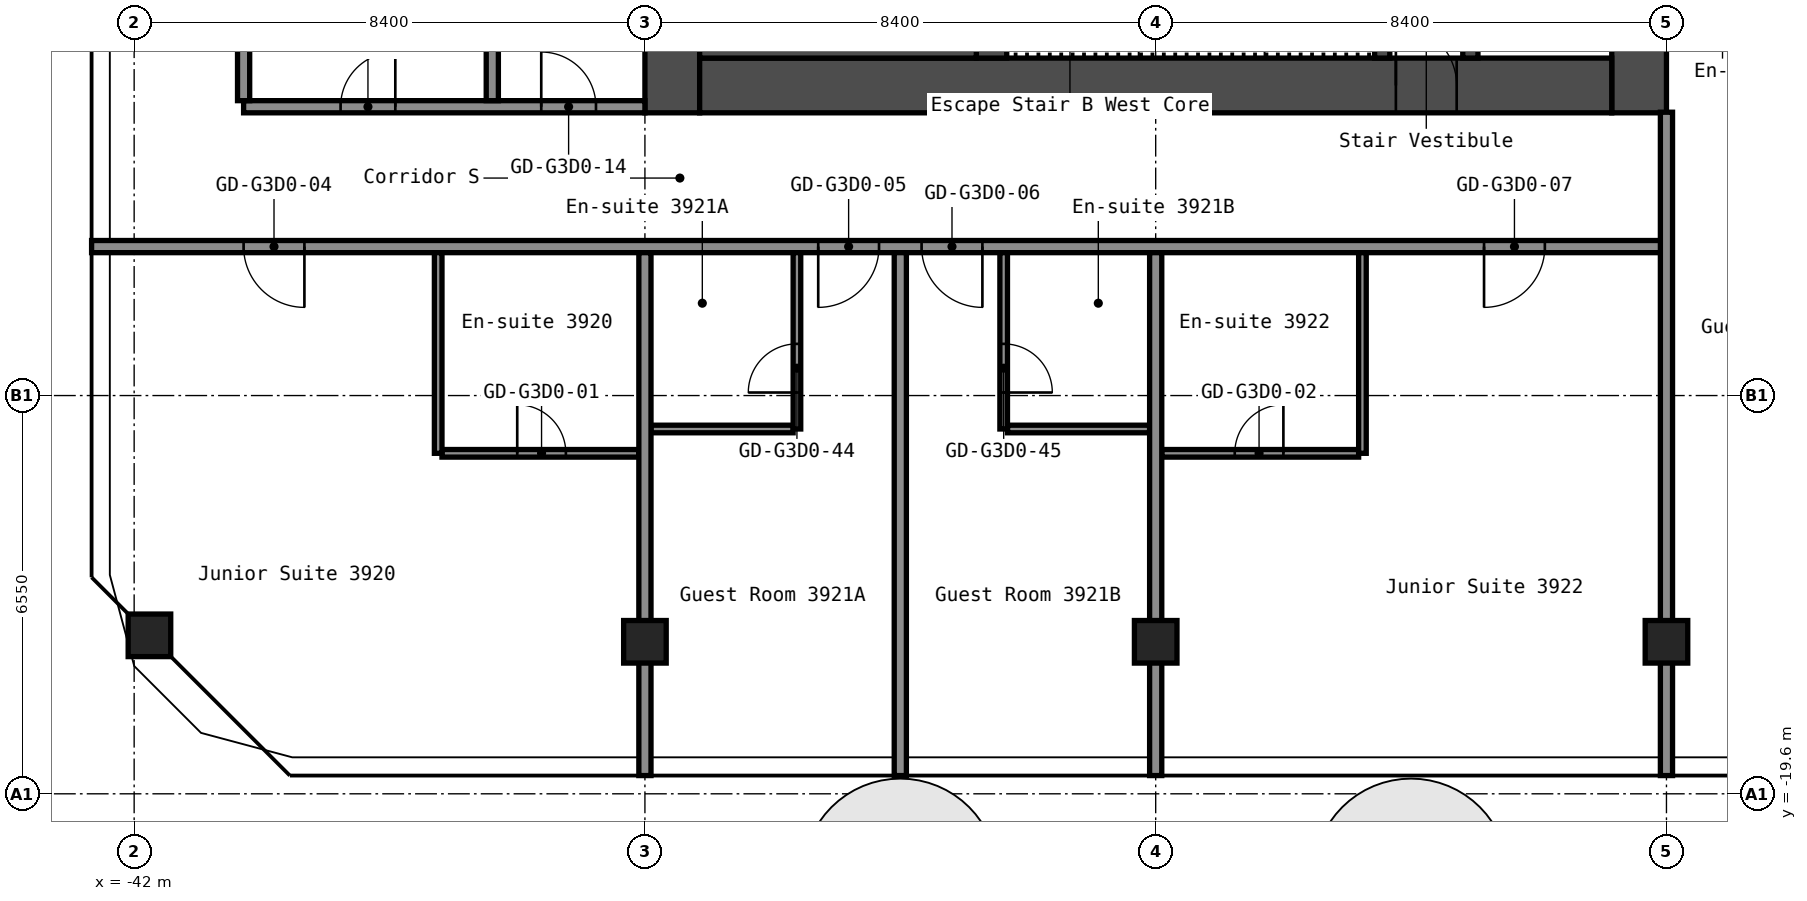
"""IFC4 building model, lengths in metres.
Left out: names, types, materials, properties, quantities, classifications, styles, units other than length and angle.
Written with IfcOpenShell. Run it as: python <this file> out.ifc"""

import sys

from ifc_helpers import new_model, si_unit, direction, frame, frame_2d, origin, origin_2d, place, context, subcontext, project, spatial, rectangle, hollow_rectangle, extrude, element, fill, save


model = new_model("IFC4")
c1 = context("Model", 3, precision=1e-05, world=origin(), true_north=direction((0.0, 1.0)))
c2 = subcontext(c1, "Body", "Model", "MODEL_VIEW")
j1 = project(units=[si_unit("LENGTHUNIT", "METRE"), si_unit("PLANEANGLEUNIT", "RADIAN")], contexts=[c1])
p1 = place(None, origin())
s1 = spatial("IfcSite", under=j1, at=p1, CompositionType="ELEMENT")
p2 = place(p1, origin())
s2 = spatial("IfcBuilding", under=s1, at=p2, CompositionType="ELEMENT")
p3 = place(p2, frame((0.0, 0.0, 140.6)))
s3 = spatial("IfcBuildingStorey", under=s2, at=p3, CompositionType="ELEMENT", Elevation=140.6)
for number, where, z_axis, x_axis in (
    (1, (-41.749, -16.994, 0.0), (0.0, 0.0, 1.0), (1.0, 0.0, 0.0)),
    (2, (-33.6, -17.1, 0.0), (0.0, 0.0, 1.0), (1.0, 0.0, 0.0)),
    (3, (-25.2, -17.1, 0.0), (0.0, 0.0, 1.0), (1.0, 0.0, 0.0)),
    (4, (-16.8, -17.1, 0.0), (0.0, 0.0, 1.0), (1.0, 0.0, 0.0)),
):
    element("IfcColumn", number, at=place(p3, frame(where, z_axis=z_axis, x_axis=x_axis)), inside=s3, PredefinedType="COLUMN", context=c2, shape_type="SweptSolid", body=[
        extrude(hollow_rectangle(XDim=0.7, YDim=0.7, WallThickness=0.028, at=origin_2d()), origin(), (0.0, 0.0, 1.0), 2.75),
    ])
p4 = place(p3, frame((-17.25, -8.4, 0.0), z_axis=(0.0, 0.0, 1.0), x_axis=(0.0, 1.0, 0.0)))
e5 = element("IfcWall", 5, at=p4, inside=s3, PredefinedType="SHEAR", context=c2, shape_type="SweptSolid", body=[
    extrude(rectangle(XDim=16.8, YDim=0.9, at=frame_2d((8.4, 0.0))), origin(), (0.0, 0.0, 1.0), 2.75),
])
p5 = place(p4, frame((7.1, 0.0, 0.0)))
e6 = element("IfcOpeningElement", 6, at=p5, cuts=e5, PredefinedType="OPENING", context=c2, shape_type="SweptSolid", body=[
    extrude(rectangle(XDim=1.6, YDim=2.1, at=frame_2d((0.8, 1.05))), frame((0.0, 0.46, 0.0), z_axis=(0.0, -1.0, 0.0), x_axis=(1.0, 0.0, 0.0)), (0.0, 0.0, 1.0), 0.92),
])
p6 = place(p3, frame((-33.15, -8.4, 0.0), z_axis=(0.0, 0.0, 1.0), x_axis=(0.0, 1.0, 0.0)))
e7 = element("IfcWall", 7, at=p6, inside=s3, PredefinedType="SHEAR", context=c2, shape_type="SweptSolid", body=[
    extrude(rectangle(XDim=16.8, YDim=0.9, at=frame_2d((8.4, 0.0))), origin(), (0.0, 0.0, 1.0), 2.75),
])
p7 = place(p3, frame((-32.7, -7.95, 0.0), z_axis=(0.0, 0.0, 1.0), x_axis=(1.0, 0.0, 0.0)))
e8 = element("IfcWall", 8, at=p7, inside=s3, PredefinedType="SHEAR", context=c2, shape_type="SweptSolid", body=[
    extrude(rectangle(XDim=15.0, YDim=0.9, at=frame_2d((7.5, 0.0))), origin(), (0.0, 0.0, 1.0), 2.75),
])
p8 = place(p7, frame((11.45, 0.0, 0.0)))
e9 = element("IfcOpeningElement", 9, at=p8, cuts=e8, PredefinedType="OPENING", context=c2, shape_type="SweptSolid", body=[
    extrude(rectangle(XDim=1.0, YDim=2.1, at=frame_2d((0.5, 1.05))), frame((0.0, 0.46, 0.0), z_axis=(0.0, -1.0, 0.0), x_axis=(1.0, 0.0, 0.0)), (0.0, 0.0, 1.0), 0.92),
])
p9 = place(p3, frame((-20.025, -7.5, 0.0), z_axis=(0.0, 0.0, 1.0), x_axis=(0.0, 1.0, 0.0)))
e10 = element("IfcWall", 10, at=p9, inside=s3, PredefinedType="SHEAR", context=c2, shape_type="SweptSolid", body=[
    extrude(rectangle(XDim=6.3, YDim=0.25, at=frame_2d((3.15, 0.0))), origin(), (0.0, 0.0, 1.0), 2.75),
])
p10 = place(p9, frame((2.4, 0.0, 0.0)))
e11 = element("IfcOpeningElement", 11, at=p10, cuts=e10, PredefinedType="OPENING", context=c2, shape_type="SweptSolid", body=[
    extrude(rectangle(XDim=1.0, YDim=2.1, at=frame_2d((0.5, 1.05))), frame((0.0, 0.135, 0.0), z_axis=(0.0, -1.0, 0.0), x_axis=(1.0, 0.0, 0.0)), (0.0, 0.0, 1.0), 0.27),
])
p11 = place(p3, frame((-21.475, -7.5, 0.0), z_axis=(0.0, 0.0, 1.0), x_axis=(0.0, 1.0, 0.0)))
e12 = element("IfcWall", 12, at=p11, inside=s3, PredefinedType="SHEAR", context=c2, shape_type="SweptSolid", body=[
    extrude(rectangle(XDim=3.75, YDim=0.25, at=frame_2d((1.875, 0.0))), origin(), (0.0, 0.0, 1.0), 2.75),
])
p12 = place(p11, frame((1.3, 0.0, 0.0)))
e13 = element("IfcOpeningElement", 13, at=p12, cuts=e12, PredefinedType="OPENING", context=c2, shape_type="SweptSolid", body=[
    extrude(rectangle(XDim=1.2, YDim=2.1, at=frame_2d((0.6, 1.05))), frame((0.0, 0.135, 0.0), z_axis=(0.0, -1.0, 0.0), x_axis=(1.0, 0.0, 0.0)), (0.0, 0.0, 1.0), 0.27),
])
p13 = place(p3, frame((-27.9, -7.5, 0.0), z_axis=(0.0, 0.0, 1.0), x_axis=(0.0, 1.0, 0.0)))
e14 = element("IfcWall", 14, at=p13, inside=s3, PredefinedType="SHEAR", context=c2, shape_type="SweptSolid", body=[
    extrude(rectangle(XDim=3.75, YDim=0.5, at=frame_2d((1.875, 0.0))), origin(), (0.0, 0.0, 1.0), 2.75),
])
p14 = place(p3, frame((-32.7, -6.75, 0.0), z_axis=(0.0, 0.0, 1.0), x_axis=(1.0, 0.0, 0.0)))
e15 = element("IfcWall", 15, at=p14, inside=s3, PredefinedType="SHEAR", context=c2, shape_type="SweptSolid", body=[
    extrude(rectangle(XDim=4.55, YDim=1.5, at=frame_2d((2.275, 0.0))), origin(), (0.0, 0.0, 1.0), 2.75),
])
p15 = place(p3, frame((-36.938, -14.0, 0.0), z_axis=(0.0, 0.0, 1.0), x_axis=(1.0, 0.0, 0.0)))
e16 = element("IfcWall", 16, at=p15, inside=s3, PredefinedType="PARTITIONING", context=c2, shape_type="SweptSolid", body=[
    extrude(rectangle(XDim=3.238, YDim=0.125, at=frame_2d((1.619, 0.0))), origin(), (0.0, 0.0, 1.0), 2.75),
])
p16 = place(p15, frame((1.238, 0.0, 0.0)))
e17 = element("IfcOpeningElement", 17, at=p16, cuts=e16, PredefinedType="OPENING", context=c2, shape_type="SweptSolid", body=[
    extrude(rectangle(XDim=0.8, YDim=2.1, at=frame_2d((0.4, 1.05))), frame((0.0, 0.073, 0.0), z_axis=(0.0, -1.0, 0.0), x_axis=(1.0, 0.0, 0.0)), (0.0, 0.0, 1.0), 0.145),
])
p17 = place(p3, frame((-25.1, -14.0, 0.0), z_axis=(0.0, 0.0, 1.0), x_axis=(1.0, 0.0, 0.0)))
e18 = element("IfcWall", 18, at=p17, inside=s3, PredefinedType="PARTITIONING", context=c2, shape_type="SweptSolid", body=[
    extrude(rectangle(XDim=3.238, YDim=0.125, at=frame_2d((1.619, 0.0))), origin(), (0.0, 0.0, 1.0), 2.75),
])
p18 = place(p17, frame((1.2, 0.0, 0.0)))
e19 = element("IfcOpeningElement", 19, at=p18, cuts=e18, PredefinedType="OPENING", context=c2, shape_type="SweptSolid", body=[
    extrude(rectangle(XDim=0.8, YDim=2.1, at=frame_2d((0.4, 1.05))), frame((0.0, 0.073, 0.0), z_axis=(0.0, -1.0, 0.0), x_axis=(1.0, 0.0, 0.0)), (0.0, 0.0, 1.0), 0.145),
])
for number, where, z_axis, x_axis in (
    (20, (-33.5, -13.6, 0.0), (0.0, 0.0, 1.0), (1.0, 0.0, 0.0)),
    (21, (-27.637, -13.6, 0.0), (0.0, 0.0, 1.0), (1.0, 0.0, 0.0)),
):
    element("IfcWall", number, at=place(p3, frame(where, z_axis=z_axis, x_axis=x_axis)), inside=s3, PredefinedType="PARTITIONING", context=c2, shape_type="SweptSolid", body=[
        extrude(rectangle(XDim=2.337, YDim=0.125, at=frame_2d((1.169, 0.0))), origin(), (0.0, 0.0, 1.0), 2.75),
    ])
p19 = place(p3, frame((-42.7, -10.6, 0.0), z_axis=(0.0, 0.0, 1.0), x_axis=(1.0, 0.0, 0.0)))
e22 = element("IfcWall", 22, at=p19, inside=s3, PredefinedType="PARTITIONING", context=c2, shape_type="SweptSolid", body=[
    extrude(rectangle(XDim=25.9, YDim=0.2, at=frame_2d((12.95, 0.0))), origin(), (0.0, 0.0, 1.0), 2.75),
])
p20 = place(p19, frame((2.5, 0.0, 0.0)))
e23 = element("IfcOpeningElement", 23, at=p20, cuts=e22, PredefinedType="OPENING", context=c2, shape_type="SweptSolid", body=[
    extrude(rectangle(XDim=1.0, YDim=2.1, at=frame_2d((0.5, 1.05))), frame((0.0, 0.11, 0.0), z_axis=(0.0, -1.0, 0.0), x_axis=(1.0, 0.0, 0.0)), (0.0, 0.0, 1.0), 0.22),
])
p21 = place(p19, frame((11.95, 0.0, 0.0)))
e24 = element("IfcOpeningElement", 24, at=p21, cuts=e22, PredefinedType="OPENING", context=c2, shape_type="SweptSolid", body=[
    extrude(rectangle(XDim=1.0, YDim=2.1, at=frame_2d((0.5, 1.05))), frame((0.0, 0.11, 0.0), z_axis=(0.0, -1.0, 0.0), x_axis=(1.0, 0.0, 0.0)), (0.0, 0.0, 1.0), 0.22),
])
p22 = place(p19, frame((13.65, 0.0, 0.0)))
e25 = element("IfcOpeningElement", 25, at=p22, cuts=e22, PredefinedType="OPENING", context=c2, shape_type="SweptSolid", body=[
    extrude(rectangle(XDim=1.0, YDim=2.1, at=frame_2d((0.5, 1.05))), frame((0.0, 0.11, 0.0), z_axis=(0.0, -1.0, 0.0), x_axis=(1.0, 0.0, 0.0)), (0.0, 0.0, 1.0), 0.22),
])
p23 = place(p19, frame((22.9, 0.0, 0.0)))
e26 = element("IfcOpeningElement", 26, at=p23, cuts=e22, PredefinedType="OPENING", context=c2, shape_type="SweptSolid", body=[
    extrude(rectangle(XDim=1.0, YDim=2.1, at=frame_2d((0.5, 1.05))), frame((0.0, 0.11, 0.0), z_axis=(0.0, -1.0, 0.0), x_axis=(1.0, 0.0, 0.0)), (0.0, 0.0, 1.0), 0.22),
])
p24 = place(p3, frame((-40.2, -8.3, 0.0), z_axis=(0.0, 0.0, 1.0), x_axis=(1.0, 0.0, 0.0)))
e27 = element("IfcWall", 27, at=p24, inside=s3, PredefinedType="PARTITIONING", context=c2, shape_type="SweptSolid", body=[
    extrude(rectangle(XDim=6.6, YDim=0.2, at=frame_2d((3.3, 0.0))), origin(), (0.0, 0.0, 1.0), 2.75),
])
p25 = place(p24, frame((1.595, 0.0, 0.0)))
e28 = element("IfcOpeningElement", 28, at=p25, cuts=e27, PredefinedType="OPENING", context=c2, shape_type="SweptSolid", body=[
    extrude(rectangle(XDim=0.9, YDim=2.1, at=frame_2d((0.45, 1.05))), frame((0.0, 0.11, 0.0), z_axis=(0.0, -1.0, 0.0), x_axis=(1.0, 0.0, 0.0)), (0.0, 0.0, 1.0), 0.22),
])
p26 = place(p24, frame((4.895, 0.0, 0.0)))
e29 = element("IfcOpeningElement", 29, at=p26, cuts=e27, PredefinedType="OPENING", context=c2, shape_type="SweptSolid", body=[
    extrude(rectangle(XDim=0.9, YDim=2.1, at=frame_2d((0.45, 1.05))), frame((0.0, 0.11, 0.0), z_axis=(0.0, -1.0, 0.0), x_axis=(1.0, 0.0, 0.0)), (0.0, 0.0, 1.0), 0.22),
])
p27 = place(p3, frame((-40.2, -8.2, 0.0), z_axis=(0.0, 0.0, 1.0), x_axis=(0.0, 1.0, 0.0)))
e30 = element("IfcWall", 30, at=p27, inside=s3, PredefinedType="PARTITIONING", context=c2, shape_type="SweptSolid", body=[
    extrude(rectangle(XDim=16.4, YDim=0.2, at=frame_2d((8.2, 0.0))), origin(), (0.0, 0.0, 1.0), 2.75),
])
p28 = place(p3, frame((-37.0, -14.0, 0.0), z_axis=(0.0, 0.0, 1.0), x_axis=(0.0, 1.0, 0.0)))
e31 = element("IfcWall", 31, at=p28, inside=s3, PredefinedType="PARTITIONING", context=c2, shape_type="SweptSolid", body=[
    extrude(rectangle(XDim=3.3, YDim=0.125, at=frame_2d((1.65, 0.0))), origin(), (0.0, 0.0, 1.0), 2.75),
])
p29 = place(p3, frame((-36.11, -8.2, 0.0), z_axis=(0.0, 0.0, 1.0), x_axis=(0.0, 1.0, 0.0)))
e32 = element("IfcWall", 32, at=p29, inside=s3, PredefinedType="PARTITIONING", context=c2, shape_type="SweptSolid", body=[
    extrude(rectangle(XDim=8.2, YDim=0.2, at=frame_2d((4.1, 0.0))), origin(), (0.0, 0.0, 1.0), 2.75),
])
p30 = place(p3, frame((-33.6, -19.3, 0.0), z_axis=(0.0, 0.0, 1.0), x_axis=(0.0, 1.0, 0.0)))
e33 = element("IfcWall", 33, at=p30, inside=s3, PredefinedType="PARTITIONING", context=c2, shape_type="SweptSolid", body=[
    extrude(rectangle(XDim=8.6, YDim=0.2, at=frame_2d((4.3, 0.0))), origin(), (0.0, 0.0, 1.0), 2.75),
])
p31 = place(p3, frame((-31.1, -13.6, 0.0), z_axis=(0.0, 0.0, 1.0), x_axis=(0.0, 1.0, 0.0)))
e34 = element("IfcWall", 34, at=p31, inside=s3, PredefinedType="PARTITIONING", context=c2, shape_type="SweptSolid", body=[
    extrude(rectangle(XDim=2.9, YDim=0.125, at=frame_2d((1.45, 0.0))), origin(), (0.0, 0.0, 1.0), 2.75),
])
p32 = place(p31, frame((0.6, 0.0, 0.0)))
e35 = element("IfcOpeningElement", 35, at=p32, cuts=e34, PredefinedType="OPENING", context=c2, shape_type="SweptSolid", body=[
    extrude(rectangle(XDim=0.8, YDim=2.1, at=frame_2d((0.4, 1.05))), frame((0.0, 0.073, 0.0), z_axis=(0.0, -1.0, 0.0), x_axis=(1.0, 0.0, 0.0)), (0.0, 0.0, 1.0), 0.145),
])
p33 = place(p3, frame((-29.4, -19.3, 0.0), z_axis=(0.0, 0.0, 1.0), x_axis=(0.0, 1.0, 0.0)))
e36 = element("IfcWall", 36, at=p33, inside=s3, PredefinedType="PARTITIONING", context=c2, shape_type="SweptSolid", body=[
    extrude(rectangle(XDim=8.6, YDim=0.2, at=frame_2d((4.3, 0.0))), origin(), (0.0, 0.0, 1.0), 2.75),
])
p34 = place(p3, frame((-27.7, -13.6, 0.0), z_axis=(0.0, 0.0, 1.0), x_axis=(0.0, 1.0, 0.0)))
e37 = element("IfcWall", 37, at=p34, inside=s3, PredefinedType="PARTITIONING", context=c2, shape_type="SweptSolid", body=[
    extrude(rectangle(XDim=2.9, YDim=0.125, at=frame_2d((1.45, 0.0))), origin(), (0.0, 0.0, 1.0), 2.75),
])
p35 = place(p34, frame((0.6, 0.0, 0.0)))
e38 = element("IfcOpeningElement", 38, at=p35, cuts=e37, PredefinedType="OPENING", context=c2, shape_type="SweptSolid", body=[
    extrude(rectangle(XDim=0.8, YDim=2.1, at=frame_2d((0.4, 1.05))), frame((0.0, 0.073, 0.0), z_axis=(0.0, -1.0, 0.0), x_axis=(1.0, 0.0, 0.0)), (0.0, 0.0, 1.0), 0.145),
])
p36 = place(p3, frame((-25.2, -19.3, 0.0), z_axis=(0.0, 0.0, 1.0), x_axis=(0.0, 1.0, 0.0)))
e39 = element("IfcWall", 39, at=p36, inside=s3, PredefinedType="PARTITIONING", context=c2, shape_type="SweptSolid", body=[
    extrude(rectangle(XDim=8.6, YDim=0.2, at=frame_2d((4.3, 0.0))), origin(), (0.0, 0.0, 1.0), 2.75),
])
p37 = place(p3, frame((-21.8, -14.0, 0.0), z_axis=(0.0, 0.0, 1.0), x_axis=(0.0, 1.0, 0.0)))
e40 = element("IfcWall", 40, at=p37, inside=s3, PredefinedType="PARTITIONING", context=c2, shape_type="SweptSolid", body=[
    extrude(rectangle(XDim=3.3, YDim=0.125, at=frame_2d((1.65, 0.0))), origin(), (0.0, 0.0, 1.0), 2.75),
])
p38 = place(p3, frame((-16.8, -19.3, 0.0), z_axis=(0.0, 0.0, 1.0), x_axis=(0.0, 1.0, 0.0)))
e41 = element("IfcWall", 41, at=p38, inside=s3, PredefinedType="PARTITIONING", context=c2, shape_type="SweptSolid", body=[
    extrude(rectangle(XDim=10.91, YDim=0.2, at=frame_2d((5.455, 0.0))), origin(), (0.0, 0.0, 1.0), 2.75),
])
p39 = place(p8, origin())
e42 = element("IfcDoor", 42, at=p39, inside=s3, OperationType="SINGLE_SWING_RIGHT", PredefinedType="DOOR", context=c2, shape_type="SweptSolid", body=[
    extrude(rectangle(XDim=1.0, YDim=2.1, at=frame_2d((0.5, 1.05))), frame((0.0, 0.025, 0.0), z_axis=(0.0, -1.0, 0.0), x_axis=(1.0, 0.0, 0.0)), (0.0, 0.0, 1.0), 0.05),
])
fill(e9, e42)
p40 = place(p16, origin())
e43 = element("IfcDoor", 43, at=p40, inside=s3, OperationType="SINGLE_SWING_RIGHT", PredefinedType="DOOR", context=c2, shape_type="SweptSolid", body=[
    extrude(rectangle(XDim=0.8, YDim=2.1, at=frame_2d((0.4, 1.05))), frame((0.0, 0.025, 0.0), z_axis=(0.0, -1.0, 0.0), x_axis=(1.0, 0.0, 0.0)), (0.0, 0.0, 1.0), 0.05),
])
fill(e17, e43)
p41 = place(p18, origin())
e44 = element("IfcDoor", 44, at=p41, inside=s3, OperationType="SINGLE_SWING_LEFT", PredefinedType="DOOR", context=c2, shape_type="SweptSolid", body=[
    extrude(rectangle(XDim=0.8, YDim=2.1, at=frame_2d((0.4, 1.05))), frame((0.0, 0.025, 0.0), z_axis=(0.0, -1.0, 0.0), x_axis=(1.0, 0.0, 0.0)), (0.0, 0.0, 1.0), 0.05),
])
fill(e19, e44)
p42 = place(p20, origin())
e45 = element("IfcDoor", 45, at=p42, inside=s3, OperationType="SINGLE_SWING_RIGHT", PredefinedType="DOOR", context=c2, shape_type="SweptSolid", body=[
    extrude(rectangle(XDim=1.0, YDim=2.1, at=frame_2d((0.5, 1.05))), frame((0.0, 0.025, 0.0), z_axis=(0.0, -1.0, 0.0), x_axis=(1.0, 0.0, 0.0)), (0.0, 0.0, 1.0), 0.05),
])
fill(e23, e45)
p43 = place(p21, origin())
e46 = element("IfcDoor", 46, at=p43, inside=s3, OperationType="SINGLE_SWING_LEFT", PredefinedType="DOOR", context=c2, shape_type="SweptSolid", body=[
    extrude(rectangle(XDim=1.0, YDim=2.1, at=frame_2d((0.5, 1.05))), frame((0.0, 0.025, 0.0), z_axis=(0.0, -1.0, 0.0), x_axis=(1.0, 0.0, 0.0)), (0.0, 0.0, 1.0), 0.05),
])
fill(e24, e46)
p44 = place(p22, origin())
e47 = element("IfcDoor", 47, at=p44, inside=s3, OperationType="SINGLE_SWING_RIGHT", PredefinedType="DOOR", context=c2, shape_type="SweptSolid", body=[
    extrude(rectangle(XDim=1.0, YDim=2.1, at=frame_2d((0.5, 1.05))), frame((0.0, 0.025, 0.0), z_axis=(0.0, -1.0, 0.0), x_axis=(1.0, 0.0, 0.0)), (0.0, 0.0, 1.0), 0.05),
])
fill(e25, e47)
p45 = place(p23, origin())
e48 = element("IfcDoor", 48, at=p45, inside=s3, OperationType="SINGLE_SWING_LEFT", PredefinedType="DOOR", context=c2, shape_type="SweptSolid", body=[
    extrude(rectangle(XDim=1.0, YDim=2.1, at=frame_2d((0.5, 1.05))), frame((0.0, 0.025, 0.0), z_axis=(0.0, -1.0, 0.0), x_axis=(1.0, 0.0, 0.0)), (0.0, 0.0, 1.0), 0.05),
])
fill(e26, e48)
p46 = place(p25, origin())
e49 = element("IfcDoor", 49, at=p46, inside=s3, OperationType="SINGLE_SWING_LEFT", PredefinedType="DOOR", context=c2, shape_type="SweptSolid", body=[
    extrude(rectangle(XDim=0.9, YDim=2.1, at=frame_2d((0.45, 1.05))), frame((0.0, 0.025, 0.0), z_axis=(0.0, -1.0, 0.0), x_axis=(1.0, 0.0, 0.0)), (0.0, 0.0, 1.0), 0.05),
])
fill(e28, e49)
p47 = place(p26, origin())
e50 = element("IfcDoor", 50, at=p47, inside=s3, OperationType="SINGLE_SWING_RIGHT", PredefinedType="DOOR", context=c2, shape_type="SweptSolid", body=[
    extrude(rectangle(XDim=0.9, YDim=2.1, at=frame_2d((0.45, 1.05))), frame((0.0, 0.025, 0.0), z_axis=(0.0, -1.0, 0.0), x_axis=(1.0, 0.0, 0.0)), (0.0, 0.0, 1.0), 0.05),
])
fill(e29, e50)
p48 = place(p32, origin())
e51 = element("IfcDoor", 51, at=p48, inside=s3, OperationType="SINGLE_SWING_RIGHT", PredefinedType="DOOR", context=c2, shape_type="SweptSolid", body=[
    extrude(rectangle(XDim=0.8, YDim=2.1, at=frame_2d((0.4, 1.05))), frame((0.0, 0.025, 0.0), z_axis=(0.0, -1.0, 0.0), x_axis=(1.0, 0.0, 0.0)), (0.0, 0.0, 1.0), 0.05),
])
fill(e35, e51)
p49 = place(p35, origin())
e52 = element("IfcDoor", 52, at=p49, inside=s3, OperationType="SINGLE_SWING_LEFT", PredefinedType="DOOR", context=c2, shape_type="SweptSolid", body=[
    extrude(rectangle(XDim=0.8, YDim=2.1, at=frame_2d((0.4, 1.05))), frame((0.0, 0.025, 0.0), z_axis=(0.0, -1.0, 0.0), x_axis=(1.0, 0.0, 0.0)), (0.0, 0.0, 1.0), 0.05),
])
fill(e38, e52)
save(model, sys.argv[1])
